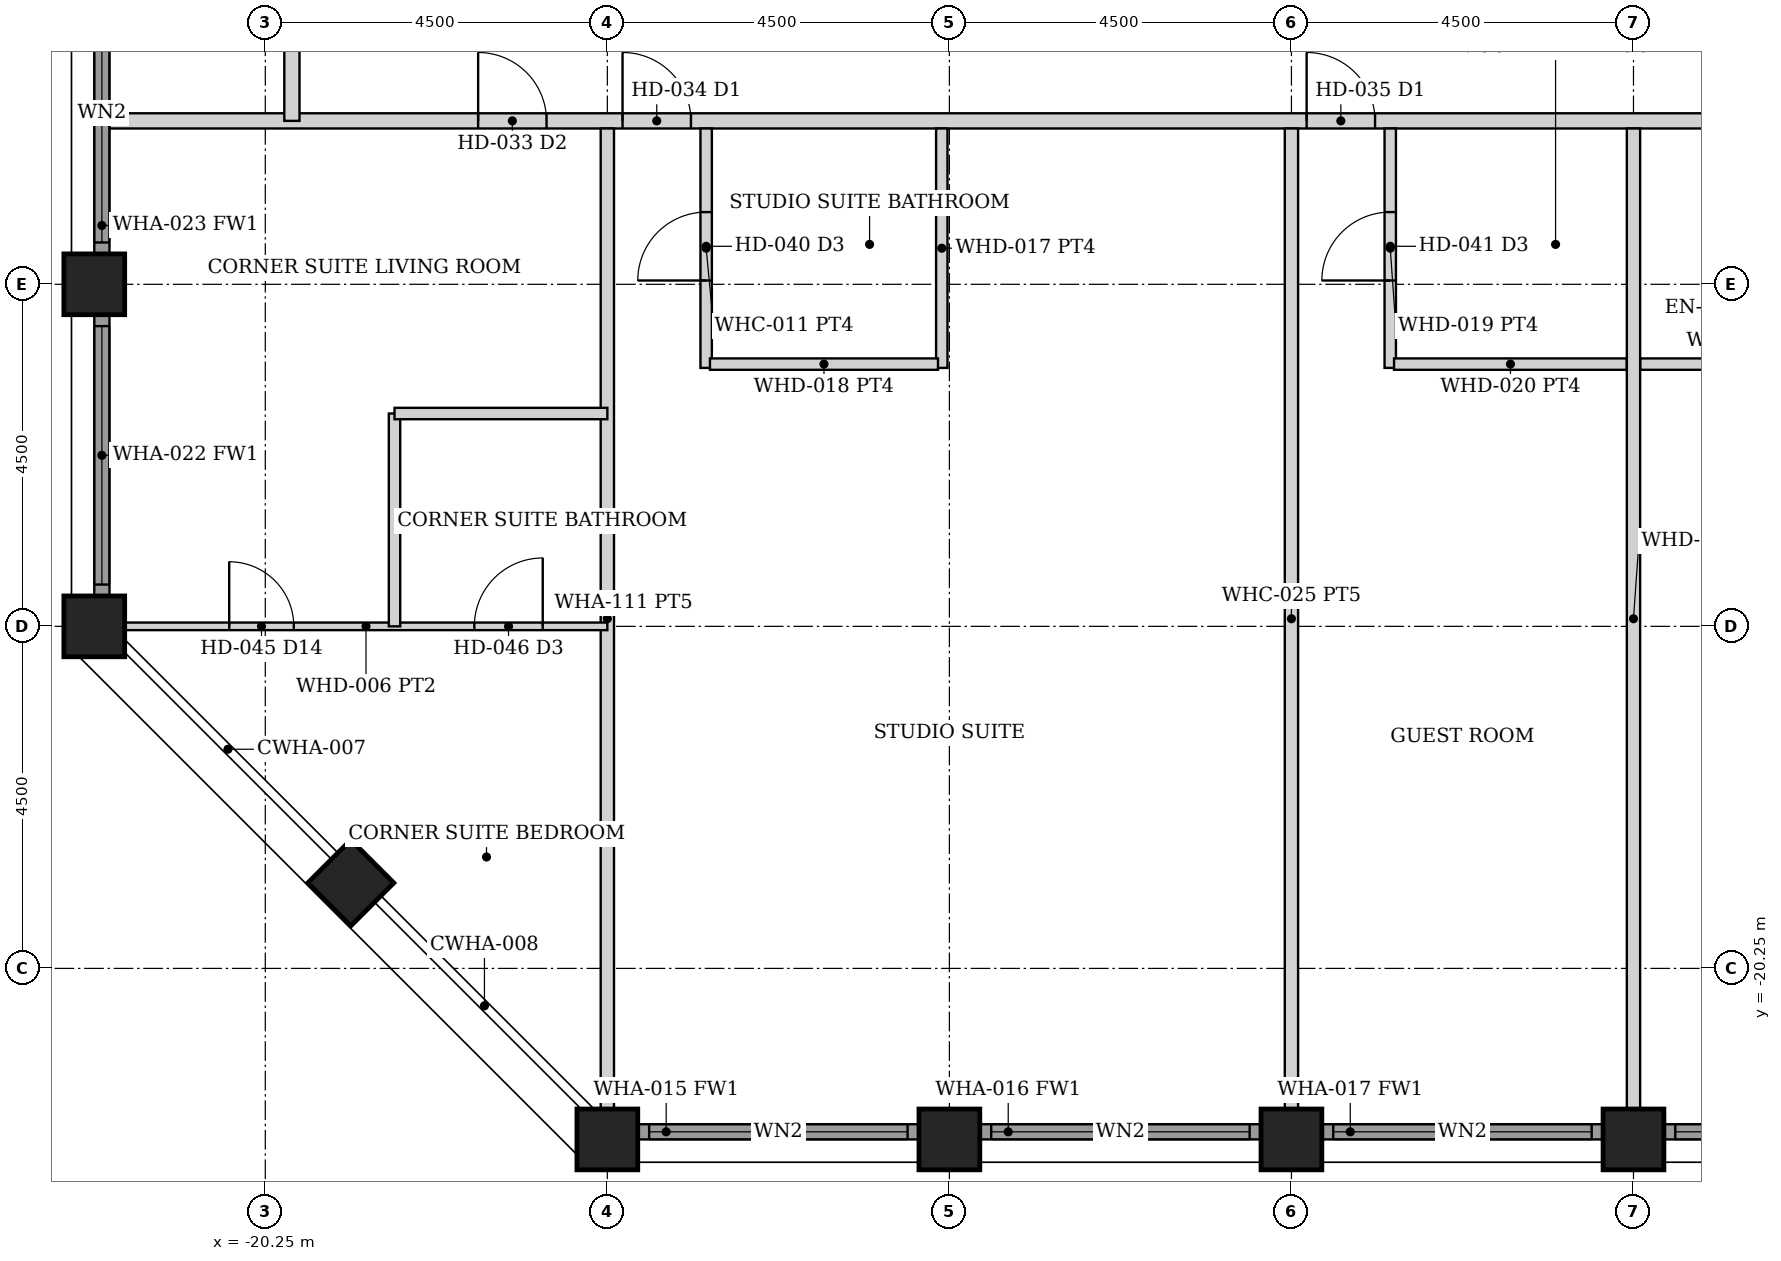
"""IFC4 building model, lengths in metres.
Left out: names, types, materials, properties, quantities, classifications, styles, units other than length and angle.
Written with IfcOpenShell. Run it as: python <this file> out.ifc"""

import sys

from ifc_helpers import new_model, si_unit, direction, frame, frame_2d, origin, origin_2d, place, context, subcontext, project, spatial, rectangle, hollow_rectangle, extrude, element, fill, save


model = new_model("IFC4")
c1 = context("Model", 3, precision=1e-05, world=origin(), true_north=direction((0.0, 1.0)))
c2 = subcontext(c1, "Body", "Model", "MODEL_VIEW")
j1 = project(units=[si_unit("LENGTHUNIT", "METRE"), si_unit("PLANEANGLEUNIT", "RADIAN")], contexts=[c1])
p1 = place(None, origin())
s1 = spatial("IfcSite", under=j1, at=p1, CompositionType="ELEMENT")
p2 = place(p1, origin())
s2 = spatial("IfcBuilding", under=s1, at=p2, CompositionType="ELEMENT")
p3 = place(p2, frame((0.0, 0.0, 150.8)))
s3 = spatial("IfcBuildingStorey", under=s2, at=p3, CompositionType="ELEMENT", Elevation=150.8)
for number, where, z_axis, x_axis in (
    (1, (-15.75, -22.5, 0.0), (0.0, 0.0, 1.0), (0.0, 1.0, 0.0)),
    (2, (-22.5, -15.75, 0.0), (0.0, 0.0, 1.0), (1.0, 0.0, 0.0)),
    (3, (-11.25, -22.5, 0.0), (0.0, 0.0, 1.0), (0.0, 1.0, 0.0)),
    (4, (-22.5, -11.25, 0.0), (0.0, 0.0, 1.0), (1.0, 0.0, 0.0)),
    (5, (-6.75, -22.5, 0.0), (0.0, 0.0, 1.0), (0.0, 1.0, 0.0)),
    (6, (-2.25, -22.5, 0.0), (0.0, 0.0, 1.0), (0.0, 1.0, 0.0)),
    (7, (-19.125, -19.125, 0.0), (0.0, 0.0, 1.0), (0.707, 0.707, 0.0)),
):
    element("IfcColumn", number, at=place(p3, frame(where, z_axis=z_axis, x_axis=x_axis)), inside=s3, PredefinedType="COLUMN", context=c2, shape_type="SweptSolid", body=[
        extrude(hollow_rectangle(XDim=0.8, YDim=0.8, WallThickness=0.05, at=origin_2d()), origin(), (0.0, 0.0, 1.0), 3.6),
    ])
p4 = place(p3, frame((-15.345, -22.4, 0.0), z_axis=(0.0, 0.0, 1.0), x_axis=(1.0, 0.0, 0.0)))
e8 = element("IfcWall", 8, at=p4, inside=s3, PredefinedType="SOLIDWALL", context=c2, shape_type="SweptSolid", body=[
    extrude(rectangle(XDim=3.69, YDim=0.2, at=frame_2d((1.845, 0.0))), origin(), (0.0, 0.0, 1.0), 2.479),
])
p5 = place(p4, frame((0.145, 0.0, 0.3)))
e9 = element("IfcOpeningElement", 9, at=p5, cuts=e8, PredefinedType="OPENING", context=c2, shape_type="SweptSolid", body=[
    extrude(rectangle(XDim=3.4, YDim=2.029, at=frame_2d((1.7, 1.015))), frame((0.0, 0.11, 0.0), z_axis=(0.0, -1.0, 0.0), x_axis=(1.0, 0.0, 0.0)), (0.0, 0.0, 1.0), 0.22),
])
p6 = place(p3, frame((-10.845, -22.4, 0.0), z_axis=(0.0, 0.0, 1.0), x_axis=(1.0, 0.0, 0.0)))
e10 = element("IfcWall", 10, at=p6, inside=s3, PredefinedType="SOLIDWALL", context=c2, shape_type="SweptSolid", body=[
    extrude(rectangle(XDim=3.69, YDim=0.2, at=frame_2d((1.845, 0.0))), origin(), (0.0, 0.0, 1.0), 2.479),
])
p7 = place(p6, frame((0.145, 0.0, 0.3)))
e11 = element("IfcOpeningElement", 11, at=p7, cuts=e10, PredefinedType="OPENING", context=c2, shape_type="SweptSolid", body=[
    extrude(rectangle(XDim=3.4, YDim=2.029, at=frame_2d((1.7, 1.015))), frame((0.0, 0.11, 0.0), z_axis=(0.0, -1.0, 0.0), x_axis=(1.0, 0.0, 0.0)), (0.0, 0.0, 1.0), 0.22),
])
p8 = place(p3, frame((-6.345, -22.4, 0.0), z_axis=(0.0, 0.0, 1.0), x_axis=(1.0, 0.0, 0.0)))
e12 = element("IfcWall", 12, at=p8, inside=s3, PredefinedType="SOLIDWALL", context=c2, shape_type="SweptSolid", body=[
    extrude(rectangle(XDim=3.69, YDim=0.2, at=frame_2d((1.845, 0.0))), origin(), (0.0, 0.0, 1.0), 2.479),
])
p9 = place(p8, frame((0.145, 0.0, 0.3)))
e13 = element("IfcOpeningElement", 13, at=p9, cuts=e12, PredefinedType="OPENING", context=c2, shape_type="SweptSolid", body=[
    extrude(rectangle(XDim=3.4, YDim=2.029, at=frame_2d((1.7, 1.015))), frame((0.0, 0.11, 0.0), z_axis=(0.0, -1.0, 0.0), x_axis=(1.0, 0.0, 0.0)), (0.0, 0.0, 1.0), 0.22),
])
p10 = place(p3, frame((-1.845, -22.4, 0.0), z_axis=(0.0, 0.0, 1.0), x_axis=(1.0, 0.0, 0.0)))
e14 = element("IfcWall", 14, at=p10, inside=s3, PredefinedType="SOLIDWALL", context=c2, shape_type="SweptSolid", body=[
    extrude(rectangle(XDim=3.69, YDim=0.2, at=frame_2d((1.845, 0.0))), origin(), (0.0, 0.0, 1.0), 2.479),
])
p11 = place(p10, frame((0.145, 0.0, 0.3)))
e15 = element("IfcOpeningElement", 15, at=p11, cuts=e14, PredefinedType="OPENING", context=c2, shape_type="SweptSolid", body=[
    extrude(rectangle(XDim=3.4, YDim=2.029, at=frame_2d((1.7, 1.015))), frame((0.0, 0.11, 0.0), z_axis=(0.0, -1.0, 0.0), x_axis=(1.0, 0.0, 0.0)), (0.0, 0.0, 1.0), 0.22),
])
p12 = place(p3, frame((-22.4, -15.345, 0.0), z_axis=(0.0, 0.0, 1.0), x_axis=(0.0, 1.0, 0.0)))
e16 = element("IfcWall", 16, at=p12, inside=s3, PredefinedType="SOLIDWALL", context=c2, shape_type="SweptSolid", body=[
    extrude(rectangle(XDim=3.69, YDim=0.2, at=frame_2d((1.845, 0.0))), origin(), (0.0, 0.0, 1.0), 2.479),
])
p13 = place(p12, frame((0.145, 0.0, 0.3)))
e17 = element("IfcOpeningElement", 17, at=p13, cuts=e16, PredefinedType="OPENING", context=c2, shape_type="SweptSolid", body=[
    extrude(rectangle(XDim=3.4, YDim=2.029, at=frame_2d((1.7, 1.015))), frame((0.0, 0.11, 0.0), z_axis=(0.0, -1.0, 0.0), x_axis=(1.0, 0.0, 0.0)), (0.0, 0.0, 1.0), 0.22),
])
p14 = place(p3, frame((-22.4, -10.845, 0.0), z_axis=(0.0, 0.0, 1.0), x_axis=(0.0, 1.0, 0.0)))
e18 = element("IfcWall", 18, at=p14, inside=s3, PredefinedType="SOLIDWALL", context=c2, shape_type="SweptSolid", body=[
    extrude(rectangle(XDim=3.69, YDim=0.2, at=frame_2d((1.845, 0.0))), origin(), (0.0, 0.0, 1.0), 2.479),
])
p15 = place(p14, frame((0.145, 0.0, 0.3)))
e19 = element("IfcOpeningElement", 19, at=p15, cuts=e18, PredefinedType="OPENING", context=c2, shape_type="SweptSolid", body=[
    extrude(rectangle(XDim=3.4, YDim=2.029, at=frame_2d((1.7, 1.015))), frame((0.0, 0.11, 0.0), z_axis=(0.0, -1.0, 0.0), x_axis=(1.0, 0.0, 0.0)), (0.0, 0.0, 1.0), 0.22),
])
p16 = place(p3, frame((-22.3, -9.1, 0.0), z_axis=(0.0, 0.0, 1.0), x_axis=(1.0, 0.0, 0.0)))
e20 = element("IfcWall", 20, at=p16, inside=s3, PredefinedType="PARTITIONING", context=c2, shape_type="SweptSolid", body=[
    extrude(rectangle(XDim=44.6, YDim=0.2, at=frame_2d((22.3, 0.0))), origin(), (0.0, 0.0, 1.0), 2.473),
])
p17 = place(p16, frame((6.75, 0.0, 0.0)))
e21 = element("IfcOpeningElement", 21, at=p17, cuts=e20, PredefinedType="OPENING", context=c2, shape_type="SweptSolid", body=[
    extrude(rectangle(XDim=0.9, YDim=2.1, at=frame_2d((0.45, 1.05))), frame((0.0, 0.11, 0.0), z_axis=(0.0, -1.0, 0.0), x_axis=(1.0, 0.0, 0.0)), (0.0, 0.0, 1.0), 0.22),
])
p18 = place(p16, frame((15.75, 0.0, 0.0)))
e22 = element("IfcOpeningElement", 22, at=p18, cuts=e20, PredefinedType="OPENING", context=c2, shape_type="SweptSolid", body=[
    extrude(rectangle(XDim=0.9, YDim=2.1, at=frame_2d((0.45, 1.05))), frame((0.0, 0.11, 0.0), z_axis=(0.0, -1.0, 0.0), x_axis=(1.0, 0.0, 0.0)), (0.0, 0.0, 1.0), 0.22),
])
p19 = place(p16, frame((23.45, 0.0, 0.0)))
e23 = element("IfcOpeningElement", 23, at=p19, cuts=e20, PredefinedType="OPENING", context=c2, shape_type="SweptSolid", body=[
    extrude(rectangle(XDim=0.9, YDim=2.1, at=frame_2d((0.45, 1.05))), frame((0.0, 0.11, 0.0), z_axis=(0.0, -1.0, 0.0), x_axis=(1.0, 0.0, 0.0)), (0.0, 0.0, 1.0), 0.22),
])
p20 = place(p16, frame((24.75, 0.0, 0.0)))
e24 = element("IfcOpeningElement", 24, at=p20, cuts=e20, PredefinedType="OPENING", context=c2, shape_type="SweptSolid", body=[
    extrude(rectangle(XDim=0.9, YDim=2.1, at=frame_2d((0.45, 1.05))), frame((0.0, 0.11, 0.0), z_axis=(0.0, -1.0, 0.0), x_axis=(1.0, 0.0, 0.0)), (0.0, 0.0, 1.0), 0.22),
])
p21 = place(p16, frame((36.95, 0.0, 0.0)))
e25 = element("IfcOpeningElement", 25, at=p21, cuts=e20, PredefinedType="OPENING", context=c2, shape_type="SweptSolid", body=[
    extrude(rectangle(XDim=0.9, YDim=2.1, at=frame_2d((0.45, 1.05))), frame((0.0, 0.11, 0.0), z_axis=(0.0, -1.0, 0.0), x_axis=(1.0, 0.0, 0.0)), (0.0, 0.0, 1.0), 0.22),
])
p22 = place(p16, frame((38.85, 0.0, 0.0)))
e26 = element("IfcOpeningElement", 26, at=p22, cuts=e20, PredefinedType="OPENING", context=c2, shape_type="SweptSolid", body=[
    extrude(rectangle(XDim=0.9, YDim=2.1, at=frame_2d((0.45, 1.05))), frame((0.0, 0.11, 0.0), z_axis=(0.0, -1.0, 0.0), x_axis=(1.0, 0.0, 0.0)), (0.0, 0.0, 1.0), 0.22),
])
p23 = place(p16, frame((4.85, 0.0, 0.0)))
e27 = element("IfcOpeningElement", 27, at=p23, cuts=e20, PredefinedType="OPENING", context=c2, shape_type="SweptSolid", body=[
    extrude(rectangle(XDim=0.9, YDim=2.1, at=frame_2d((0.45, 1.05))), frame((0.0, 0.11, 0.0), z_axis=(0.0, -1.0, 0.0), x_axis=(1.0, 0.0, 0.0)), (0.0, 0.0, 1.0), 0.22),
])
p24 = place(p3, frame((-19.9, -9.1, 0.0), z_axis=(0.0, 0.0, 1.0), x_axis=(0.0, 1.0, 0.0)))
e28 = element("IfcWall", 28, at=p24, inside=s3, PredefinedType="PARTITIONING", context=c2, shape_type="SweptSolid", body=[
    extrude(rectangle(XDim=18.2, YDim=0.2, at=frame_2d((9.1, 0.0))), origin(), (0.0, 0.0, 1.0), 2.473),
])
p25 = place(p24, frame((8.425, 0.0, 0.0)))
e29 = element("IfcOpeningElement", 29, at=p25, cuts=e28, PredefinedType="OPENING", context=c2, shape_type="SweptSolid", body=[
    extrude(rectangle(XDim=1.35, YDim=2.1, at=frame_2d((0.675, 1.05))), frame((0.0, 0.11, 0.0), z_axis=(0.0, -1.0, 0.0), x_axis=(1.0, 0.0, 0.0)), (0.0, 0.0, 1.0), 0.22),
])
p26 = place(p3, frame((-14.45, -12.35, 0.0), z_axis=(0.0, 0.0, 1.0), x_axis=(0.0, 1.0, 0.0)))
e30 = element("IfcWall", 30, at=p26, inside=s3, PredefinedType="PARTITIONING", context=c2, shape_type="SweptSolid", body=[
    extrude(rectangle(XDim=3.15, YDim=0.15, at=frame_2d((1.575, 0.0))), origin(), (0.0, 0.0, 1.0), 2.473),
])
p27 = place(p26, frame((1.15, 0.0, 0.0)))
e31 = element("IfcOpeningElement", 31, at=p27, cuts=e30, PredefinedType="OPENING", context=c2, shape_type="SweptSolid", body=[
    extrude(rectangle(XDim=0.9, YDim=2.1, at=frame_2d((0.45, 1.05))), frame((0.0, 0.085, 0.0), z_axis=(0.0, -1.0, 0.0), x_axis=(1.0, 0.0, 0.0)), (0.0, 0.0, 1.0), 0.17),
])
p28 = place(p3, frame((-11.35, -12.35, 0.0), z_axis=(0.0, 0.0, 1.0), x_axis=(0.0, 1.0, 0.0)))
e32 = element("IfcWall", 32, at=p28, inside=s3, PredefinedType="PARTITIONING", context=c2, shape_type="SweptSolid", body=[
    extrude(rectangle(XDim=3.15, YDim=0.15, at=frame_2d((1.575, 0.0))), origin(), (0.0, 0.0, 1.0), 2.473),
])
p29 = place(p3, frame((-14.4, -12.3, 0.0), z_axis=(0.0, 0.0, 1.0), x_axis=(1.0, 0.0, 0.0)))
e33 = element("IfcWall", 33, at=p29, inside=s3, PredefinedType="PARTITIONING", context=c2, shape_type="SweptSolid", body=[
    extrude(rectangle(XDim=3.0, YDim=0.15, at=frame_2d((1.5, 0.0))), origin(), (0.0, 0.0, 1.0), 2.473),
])
p30 = place(p3, frame((-5.45, -12.35, 0.0), z_axis=(0.0, 0.0, 1.0), x_axis=(0.0, 1.0, 0.0)))
e34 = element("IfcWall", 34, at=p30, inside=s3, PredefinedType="PARTITIONING", context=c2, shape_type="SweptSolid", body=[
    extrude(rectangle(XDim=3.15, YDim=0.15, at=frame_2d((1.575, 0.0))), origin(), (0.0, 0.0, 1.0), 2.473),
])
p31 = place(p30, frame((1.15, 0.0, 0.0)))
e35 = element("IfcOpeningElement", 35, at=p31, cuts=e34, PredefinedType="OPENING", context=c2, shape_type="SweptSolid", body=[
    extrude(rectangle(XDim=0.9, YDim=2.1, at=frame_2d((0.45, 1.05))), frame((0.0, 0.085, 0.0), z_axis=(0.0, -1.0, 0.0), x_axis=(1.0, 0.0, 0.0)), (0.0, 0.0, 1.0), 0.17),
])
for number, where, z_axis, x_axis in (
    (36, (-5.4, -12.3, 0.0), (0.0, 0.0, 1.0), (1.0, 0.0, 0.0)),
    (37, (-2.163, -12.3, 0.0), (0.0, 0.0, 1.0), (1.0, 0.0, 0.0)),
):
    element("IfcWall", number, at=place(p3, frame(where, z_axis=z_axis, x_axis=x_axis)), inside=s3, PredefinedType="PARTITIONING", context=c2, shape_type="SweptSolid", body=[
        extrude(rectangle(XDim=3.062, YDim=0.15, at=frame_2d((1.531, 0.0))), origin(), (0.0, 0.0, 1.0), 2.473),
    ])
for number, where, z_axis, x_axis in (
    (38, (-15.75, -22.1, 0.0), (0.0, 0.0, 1.0), (0.0, 1.0, 0.0)),
    (39, (-6.75, -22.1, 0.0), (0.0, 0.0, 1.0), (0.0, 1.0, 0.0)),
    (40, (-2.25, -22.1, 0.0), (0.0, 0.0, 1.0), (0.0, 1.0, 0.0)),
):
    element("IfcWall", number, at=place(p3, frame(where, z_axis=z_axis, x_axis=x_axis)), inside=s3, PredefinedType="PARTITIONING", context=c2, shape_type="SweptSolid", body=[
        extrude(rectangle(XDim=12.9, YDim=0.175, at=frame_2d((6.45, 0.0))), origin(), (0.0, 0.0, 1.0), 2.473),
    ])
p32 = place(p3, frame((-22.1, -15.75, 0.0), z_axis=(0.0, 0.0, 1.0), x_axis=(1.0, 0.0, 0.0)))
e41 = element("IfcWall", 41, at=p32, inside=s3, PredefinedType="PARTITIONING", context=c2, shape_type="SweptSolid", body=[
    extrude(rectangle(XDim=6.35, YDim=0.1, at=frame_2d((3.175, 0.0))), origin(), (0.0, 0.0, 1.0), 2.473),
])
p33 = place(p32, frame((1.375, 0.0, 0.0)))
e42 = element("IfcOpeningElement", 42, at=p33, cuts=e41, PredefinedType="OPENING", context=c2, shape_type="SweptSolid", body=[
    extrude(rectangle(XDim=0.85, YDim=2.1, at=frame_2d((0.425, 1.05))), frame((0.0, 0.06, 0.0), z_axis=(0.0, -1.0, 0.0), x_axis=(1.0, 0.0, 0.0)), (0.0, 0.0, 1.0), 0.12),
])
p34 = place(p32, frame((4.6, 0.0, 0.0)))
e43 = element("IfcOpeningElement", 43, at=p34, cuts=e41, PredefinedType="OPENING", context=c2, shape_type="SweptSolid", body=[
    extrude(rectangle(XDim=0.9, YDim=2.1, at=frame_2d((0.45, 1.05))), frame((0.0, 0.06, 0.0), z_axis=(0.0, -1.0, 0.0), x_axis=(1.0, 0.0, 0.0)), (0.0, 0.0, 1.0), 0.12),
])
for number, where, z_axis, x_axis in (
    (44, (-18.55, -15.75, 0.0), (0.0, 0.0, 1.0), (0.0, 1.0, 0.0)),
    (45, (-18.55, -12.95, 0.0), (0.0, 0.0, 1.0), (1.0, 0.0, 0.0)),
):
    element("IfcWall", number, at=place(p3, frame(where, z_axis=z_axis, x_axis=x_axis)), inside=s3, PredefinedType="PARTITIONING", context=c2, shape_type="SweptSolid", body=[
        extrude(rectangle(XDim=2.8, YDim=0.15, at=frame_2d((1.4, 0.0))), origin(), (0.0, 0.0, 1.0), 2.473),
    ])
p35 = place(p5, origin())
e46 = element("IfcWindow", 46, at=p35, inside=s3, PartitioningType="SINGLE_PANEL", PredefinedType="WINDOW", context=c2, shape_type="SweptSolid", body=[
    extrude(rectangle(XDim=3.4, YDim=2.029, at=frame_2d((1.7, 1.015))), frame((0.0, 0.03, 0.0), z_axis=(0.0, -1.0, 0.0), x_axis=(1.0, 0.0, 0.0)), (0.0, 0.0, 1.0), 0.06),
])
fill(e9, e46)
p36 = place(p7, origin())
e47 = element("IfcWindow", 47, at=p36, inside=s3, PartitioningType="SINGLE_PANEL", PredefinedType="WINDOW", context=c2, shape_type="SweptSolid", body=[
    extrude(rectangle(XDim=3.4, YDim=2.029, at=frame_2d((1.7, 1.015))), frame((0.0, 0.03, 0.0), z_axis=(0.0, -1.0, 0.0), x_axis=(1.0, 0.0, 0.0)), (0.0, 0.0, 1.0), 0.06),
])
fill(e11, e47)
p37 = place(p9, origin())
e48 = element("IfcWindow", 48, at=p37, inside=s3, PartitioningType="SINGLE_PANEL", PredefinedType="WINDOW", context=c2, shape_type="SweptSolid", body=[
    extrude(rectangle(XDim=3.4, YDim=2.029, at=frame_2d((1.7, 1.015))), frame((0.0, 0.03, 0.0), z_axis=(0.0, -1.0, 0.0), x_axis=(1.0, 0.0, 0.0)), (0.0, 0.0, 1.0), 0.06),
])
fill(e13, e48)
p38 = place(p11, origin())
e49 = element("IfcWindow", 49, at=p38, inside=s3, PartitioningType="SINGLE_PANEL", PredefinedType="WINDOW", context=c2, shape_type="SweptSolid", body=[
    extrude(rectangle(XDim=3.4, YDim=2.029, at=frame_2d((1.7, 1.015))), frame((0.0, 0.03, 0.0), z_axis=(0.0, -1.0, 0.0), x_axis=(1.0, 0.0, 0.0)), (0.0, 0.0, 1.0), 0.06),
])
fill(e15, e49)
p39 = place(p13, origin())
e50 = element("IfcWindow", 50, at=p39, inside=s3, PartitioningType="SINGLE_PANEL", PredefinedType="WINDOW", context=c2, shape_type="SweptSolid", body=[
    extrude(rectangle(XDim=3.4, YDim=2.029, at=frame_2d((1.7, 1.015))), frame((0.0, 0.03, 0.0), z_axis=(0.0, -1.0, 0.0), x_axis=(1.0, 0.0, 0.0)), (0.0, 0.0, 1.0), 0.06),
])
fill(e17, e50)
p40 = place(p15, origin())
e51 = element("IfcWindow", 51, at=p40, inside=s3, PartitioningType="SINGLE_PANEL", PredefinedType="WINDOW", context=c2, shape_type="SweptSolid", body=[
    extrude(rectangle(XDim=3.4, YDim=2.029, at=frame_2d((1.7, 1.015))), frame((0.0, 0.03, 0.0), z_axis=(0.0, -1.0, 0.0), x_axis=(1.0, 0.0, 0.0)), (0.0, 0.0, 1.0), 0.06),
])
fill(e19, e51)
p41 = place(p17, origin())
e52 = element("IfcDoor", 52, at=p41, inside=s3, OperationType="SINGLE_SWING_LEFT", PredefinedType="DOOR", context=c2, shape_type="SweptSolid", body=[
    extrude(rectangle(XDim=0.9, YDim=2.1, at=frame_2d((0.45, 1.05))), frame((0.0, 0.025, 0.0), z_axis=(0.0, -1.0, 0.0), x_axis=(1.0, 0.0, 0.0)), (0.0, 0.0, 1.0), 0.05),
])
fill(e21, e52)
p42 = place(p27, origin())
e53 = element("IfcDoor", 53, at=p42, inside=s3, OperationType="SINGLE_SWING_LEFT", PredefinedType="DOOR", context=c2, shape_type="SweptSolid", body=[
    extrude(rectangle(XDim=0.9, YDim=2.1, at=frame_2d((0.45, 1.05))), frame((0.0, 0.025, 0.0), z_axis=(0.0, -1.0, 0.0), x_axis=(1.0, 0.0, 0.0)), (0.0, 0.0, 1.0), 0.05),
])
fill(e31, e53)
p43 = place(p18, origin())
e54 = element("IfcDoor", 54, at=p43, inside=s3, OperationType="SINGLE_SWING_LEFT", PredefinedType="DOOR", context=c2, shape_type="SweptSolid", body=[
    extrude(rectangle(XDim=0.9, YDim=2.1, at=frame_2d((0.45, 1.05))), frame((0.0, 0.025, 0.0), z_axis=(0.0, -1.0, 0.0), x_axis=(1.0, 0.0, 0.0)), (0.0, 0.0, 1.0), 0.05),
])
fill(e22, e54)
p44 = place(p31, origin())
e55 = element("IfcDoor", 55, at=p44, inside=s3, OperationType="SINGLE_SWING_LEFT", PredefinedType="DOOR", context=c2, shape_type="SweptSolid", body=[
    extrude(rectangle(XDim=0.9, YDim=2.1, at=frame_2d((0.45, 1.05))), frame((0.0, 0.025, 0.0), z_axis=(0.0, -1.0, 0.0), x_axis=(1.0, 0.0, 0.0)), (0.0, 0.0, 1.0), 0.05),
])
fill(e35, e55)
p45 = place(p23, origin())
e56 = element("IfcDoor", 56, at=p45, inside=s3, OperationType="SINGLE_SWING_LEFT", PredefinedType="DOOR", context=c2, shape_type="SweptSolid", body=[
    extrude(rectangle(XDim=0.9, YDim=2.1, at=frame_2d((0.45, 1.05))), frame((0.0, 0.025, 0.0), z_axis=(0.0, -1.0, 0.0), x_axis=(1.0, 0.0, 0.0)), (0.0, 0.0, 1.0), 0.05),
])
fill(e27, e56)
p46 = place(p33, origin())
e57 = element("IfcDoor", 57, at=p46, inside=s3, OperationType="SINGLE_SWING_LEFT", PredefinedType="DOOR", context=c2, shape_type="SweptSolid", body=[
    extrude(rectangle(XDim=0.85, YDim=2.1, at=frame_2d((0.425, 1.05))), frame((0.0, 0.025, 0.0), z_axis=(0.0, -1.0, 0.0), x_axis=(1.0, 0.0, 0.0)), (0.0, 0.0, 1.0), 0.05),
])
fill(e42, e57)
p47 = place(p34, origin())
e58 = element("IfcDoor", 58, at=p47, inside=s3, OperationType="SINGLE_SWING_RIGHT", PredefinedType="DOOR", context=c2, shape_type="SweptSolid", body=[
    extrude(rectangle(XDim=0.9, YDim=2.1, at=frame_2d((0.45, 1.05))), frame((0.0, 0.025, 0.0), z_axis=(0.0, -1.0, 0.0), x_axis=(1.0, 0.0, 0.0)), (0.0, 0.0, 1.0), 0.05),
])
fill(e43, e58)
save(model, sys.argv[1])
